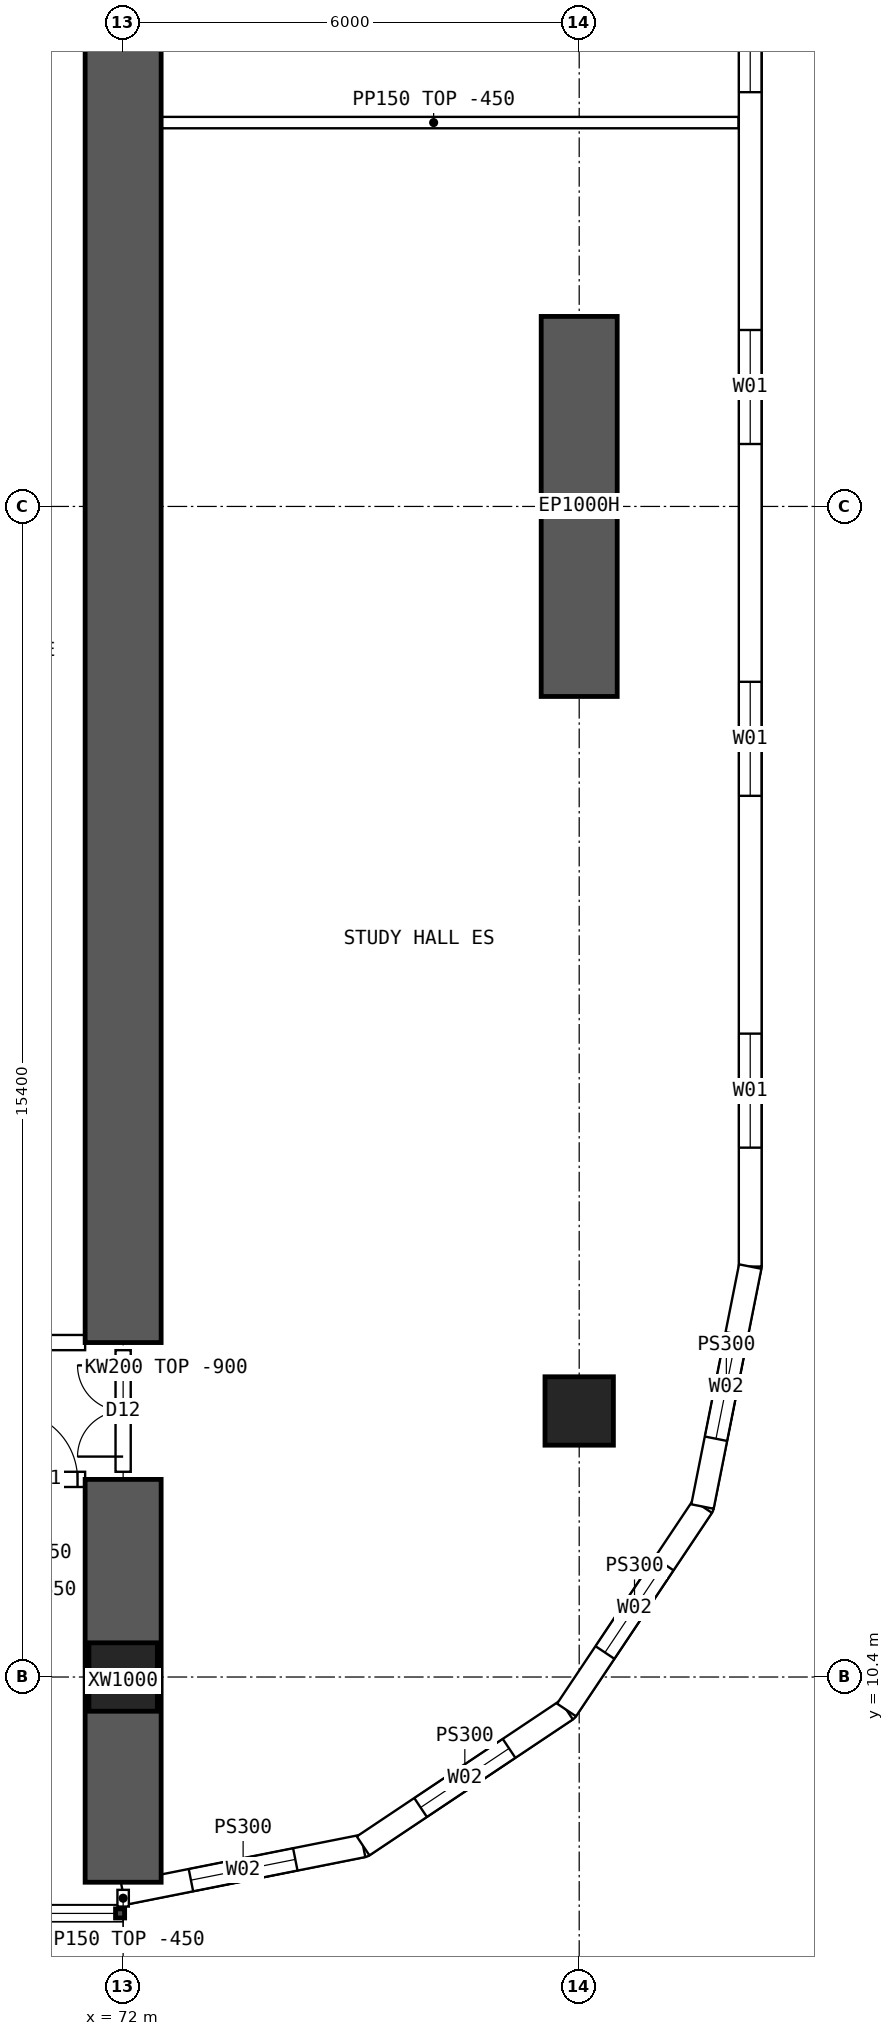
"""IFC4 building model, lengths in metres.
Left out: names, types, materials, properties, quantities, classifications, styles, units other than length and angle.
Written with IfcOpenShell. Run it as: python <this file> out.ifc"""

import sys

from ifc_helpers import new_model, si_unit, direction, frame, frame_2d, origin, origin_2d, place, context, subcontext, project, spatial, polyline, rectangle, hollow_rectangle, outline, extrude, element, fill, save


model = new_model("IFC4")
c1 = context("Model", 3, precision=1e-05, world=origin(), true_north=direction((0.0, 1.0)))
c2 = subcontext(c1, "Body", "Model", "MODEL_VIEW")
j1 = project(units=[si_unit("LENGTHUNIT", "METRE"), si_unit("PLANEANGLEUNIT", "RADIAN")], contexts=[c1])
p1 = place(None, origin())
s1 = spatial("IfcSite", under=j1, at=p1, CompositionType="ELEMENT")
p2 = place(p1, origin())
s2 = spatial("IfcBuilding", under=s1, at=p2, CompositionType="ELEMENT")
p3 = place(p2, frame((0.0, 0.0, 35.2)))
s3 = spatial("IfcBuildingStorey", under=s2, at=p3, CompositionType="ELEMENT", Elevation=35.2)
for number, where, z_axis, x_axis in (
    (1, (72.0, 10.4, 0.0), (0.0, 0.0, 1.0), (1.0, 0.0, 0.0)),
    (2, (78.0, 13.9, 0.0), (0.0, 0.0, 1.0), (1.0, 0.0, 0.0)),
):
    element("IfcColumn", number, at=place(p3, frame(where, z_axis=z_axis, x_axis=x_axis)), inside=s3, PredefinedType="COLUMN", context=c2, shape_type="SweptSolid", body=[
        extrude(hollow_rectangle(XDim=0.9, YDim=0.9, WallThickness=0.09, at=origin_2d()), origin(), (0.0, 0.0, 1.0), 3.75),
    ])
p4 = place(p3, frame((78.0, 23.3, 0.0), z_axis=(0.0, 0.0, 1.0), x_axis=(0.0, 1.0, 0.0)))
e3 = element("IfcWall", 3, at=p4, inside=s3, PredefinedType="SHEAR", context=c2, shape_type="SweptSolid", body=[
    extrude(rectangle(XDim=5.0, YDim=1.0, at=frame_2d((2.5, 0.0))), origin(), (0.0, 0.0, 1.0), 3.75),
])
p5 = place(p3, frame((72.0, 7.7, 0.0), z_axis=(0.0, 0.0, 1.0), x_axis=(0.0, 1.0, 0.0)))
e4 = element("IfcWall", 4, at=p5, inside=s3, PredefinedType="SHEAR", context=c2, shape_type="SweptSolid", body=[
    extrude(rectangle(XDim=5.3, YDim=1.0, at=frame_2d((2.65, 0.0))), origin(), (0.0, 0.0, 1.0), 3.75),
])
p6 = place(p3, frame((72.0, 14.8, 0.0), z_axis=(0.0, 0.0, 1.0), x_axis=(0.0, 1.0, 0.0)))
e5 = element("IfcWall", 5, at=p6, inside=s3, PredefinedType="SHEAR", context=c2, shape_type="SweptSolid", body=[
    extrude(rectangle(XDim=34.4, YDim=1.0, at=frame_2d((17.2, 0.0))), origin(), (0.0, 0.0, 1.0), 3.75),
])
p7 = place(p3, frame((80.25, 15.8, 0.0), z_axis=(0.0, 0.0, 1.0), x_axis=(0.0, 1.0, 0.0)))
e6 = element("IfcWall", 6, at=p7, inside=s3, PredefinedType="SOLIDWALL", context=c2, shape_type="SweptSolid", body=[
    extrude(outline(polyline([(-0.015, -0.15), (32.415, -0.15), (32.385, 0.15), (0.015, 0.15), (-0.015, -0.15)])), origin(), (0.0, 0.0, 1.0), 3.3),
])
p8 = place(p7, frame((1.564, 0.0, 0.9)))
e7 = element("IfcOpeningElement", 7, at=p8, cuts=e6, PredefinedType="OPENING", context=c2, shape_type="SweptSolid", body=[
    extrude(rectangle(XDim=1.5, YDim=2.0, at=frame_2d((0.75, 1.0))), frame((0.0, 0.16, 0.0), z_axis=(0.0, -1.0, 0.0), x_axis=(1.0, 0.0, 0.0)), (0.0, 0.0, 1.0), 0.32),
])
p9 = place(p7, frame((6.193, 0.0, 0.9)))
e8 = element("IfcOpeningElement", 8, at=p9, cuts=e6, PredefinedType="OPENING", context=c2, shape_type="SweptSolid", body=[
    extrude(rectangle(XDim=1.5, YDim=2.0, at=frame_2d((0.75, 1.0))), frame((0.0, 0.16, 0.0), z_axis=(0.0, -1.0, 0.0), x_axis=(1.0, 0.0, 0.0)), (0.0, 0.0, 1.0), 0.32),
])
p10 = place(p7, frame((10.822, 0.0, 0.9)))
e9 = element("IfcOpeningElement", 9, at=p10, cuts=e6, PredefinedType="OPENING", context=c2, shape_type="SweptSolid", body=[
    extrude(rectangle(XDim=1.5, YDim=2.0, at=frame_2d((0.75, 1.0))), frame((0.0, 0.16, 0.0), z_axis=(0.0, -1.0, 0.0), x_axis=(1.0, 0.0, 0.0)), (0.0, 0.0, 1.0), 0.32),
])
p11 = place(p7, frame((15.45, 0.0, 0.9)))
e10 = element("IfcOpeningElement", 10, at=p11, cuts=e6, PredefinedType="OPENING", context=c2, shape_type="SweptSolid", body=[
    extrude(rectangle(XDim=1.5, YDim=2.0, at=frame_2d((0.75, 1.0))), frame((0.0, 0.16, 0.0), z_axis=(0.0, -1.0, 0.0), x_axis=(1.0, 0.0, 0.0)), (0.0, 0.0, 1.0), 0.32),
])
p12 = place(p7, frame((20.079, 0.0, 0.9)))
e11 = element("IfcOpeningElement", 11, at=p12, cuts=e6, PredefinedType="OPENING", context=c2, shape_type="SweptSolid", body=[
    extrude(rectangle(XDim=1.5, YDim=2.0, at=frame_2d((0.75, 1.0))), frame((0.0, 0.16, 0.0), z_axis=(0.0, -1.0, 0.0), x_axis=(1.0, 0.0, 0.0)), (0.0, 0.0, 1.0), 0.32),
])
p13 = place(p7, frame((24.707, 0.0, 0.9)))
e12 = element("IfcOpeningElement", 12, at=p13, cuts=e6, PredefinedType="OPENING", context=c2, shape_type="SweptSolid", body=[
    extrude(rectangle(XDim=1.5, YDim=2.0, at=frame_2d((0.75, 1.0))), frame((0.0, 0.16, 0.0), z_axis=(0.0, -1.0, 0.0), x_axis=(1.0, 0.0, 0.0)), (0.0, 0.0, 1.0), 0.32),
])
p14 = place(p7, frame((29.336, 0.0, 0.9)))
e13 = element("IfcOpeningElement", 13, at=p14, cuts=e6, PredefinedType="OPENING", context=c2, shape_type="SweptSolid", body=[
    extrude(rectangle(XDim=1.5, YDim=2.0, at=frame_2d((0.75, 1.0))), frame((0.0, 0.16, 0.0), z_axis=(0.0, -1.0, 0.0), x_axis=(1.0, 0.0, 0.0)), (0.0, 0.0, 1.0), 0.32),
])
p15 = place(p3, frame((72.0, 7.55, 0.0), z_axis=(0.0, 0.0, 1.0), x_axis=(0.980787251524, 0.195080412259, 0.0)))
e14 = element("IfcWall", 14, at=p15, inside=s3, PredefinedType="SOLIDWALL", context=c2, shape_type="SweptSolid", body=[
    extrude(outline(polyline([(-0.03, -0.15), (3.249, -0.15), (3.189, 0.15), (0.03, 0.15), (-0.03, -0.15)])), origin(), (0.0, 0.0, 1.0), 3.3),
])
p16 = place(p15, frame((0.909, 0.0, 0.9)))
e15 = element("IfcOpeningElement", 15, at=p16, cuts=e14, PredefinedType="OPENING", context=c2, shape_type="SweptSolid", body=[
    extrude(rectangle(XDim=1.4, YDim=1.8, at=frame_2d((0.7, 0.9))), frame((0.0, 0.16, 0.0), z_axis=(0.0, -1.0, 0.0), x_axis=(1.0, 0.0, 0.0)), (0.0, 0.0, 1.0), 0.32),
])
p17 = place(p3, frame((75.157, 8.178, 0.0), z_axis=(0.0, 0.0, 1.0), x_axis=(0.831478105043, 0.555557522525, 0.0)))
e16 = element("IfcWall", 16, at=p17, inside=s3, PredefinedType="SOLIDWALL", context=c2, shape_type="SweptSolid", body=[
    extrude(outline(polyline([(-0.03, -0.15), (3.249, -0.15), (3.189, 0.15), (0.03, 0.15), (-0.03, -0.15)])), origin(), (0.0, 0.0, 1.0), 3.3),
])
p18 = place(p17, frame((0.909, 0.0, 0.9)))
e17 = element("IfcOpeningElement", 17, at=p18, cuts=e16, PredefinedType="OPENING", context=c2, shape_type="SweptSolid", body=[
    extrude(rectangle(XDim=1.4, YDim=1.8, at=frame_2d((0.7, 0.9))), frame((0.0, 0.16, 0.0), z_axis=(0.0, -1.0, 0.0), x_axis=(1.0, 0.0, 0.0)), (0.0, 0.0, 1.0), 0.32),
])
p19 = place(p3, frame((77.833, 9.966, 0.0), z_axis=(0.0, 0.0, 1.0), x_axis=(0.555609954424, 0.831443069936, 0.0)))
e18 = element("IfcWall", 18, at=p19, inside=s3, PredefinedType="SOLIDWALL", context=c2, shape_type="SweptSolid", body=[
    extrude(outline(polyline([(-0.03, -0.15), (3.249, -0.15), (3.189, 0.15), (0.03, 0.15), (-0.03, -0.15)])), origin(), (0.0, 0.0, 1.0), 3.3),
])
p20 = place(p19, frame((0.909, 0.0, 0.9)))
e19 = element("IfcOpeningElement", 19, at=p20, cuts=e18, PredefinedType="OPENING", context=c2, shape_type="SweptSolid", body=[
    extrude(rectangle(XDim=1.4, YDim=1.8, at=frame_2d((0.7, 0.9))), frame((0.0, 0.16, 0.0), z_axis=(0.0, -1.0, 0.0), x_axis=(1.0, 0.0, 0.0)), (0.0, 0.0, 1.0), 0.32),
])
p21 = place(p3, frame((79.622, 12.643, 0.0), z_axis=(0.0, 0.0, 1.0), x_axis=(0.195065901187, 0.980790137692, 0.0)))
e20 = element("IfcWall", 20, at=p21, inside=s3, PredefinedType="SOLIDWALL", context=c2, shape_type="SweptSolid", body=[
    extrude(outline(polyline([(-0.03, -0.15), (3.234, -0.15), (3.204, 0.15), (0.03, 0.15), (-0.03, -0.15)])), origin(), (0.0, 0.0, 1.0), 3.3),
])
p22 = place(p21, frame((0.909, 0.0, 0.9)))
e21 = element("IfcOpeningElement", 21, at=p22, cuts=e20, PredefinedType="OPENING", context=c2, shape_type="SweptSolid", body=[
    extrude(rectangle(XDim=1.4, YDim=1.8, at=frame_2d((0.7, 0.9))), frame((0.0, 0.16, 0.0), z_axis=(0.0, -1.0, 0.0), x_axis=(1.0, 0.0, 0.0)), (0.0, 0.0, 1.0), 0.32),
])
p23 = place(p3, frame((66.5, 13.0, 0.0), z_axis=(0.0, 0.0, 1.0), x_axis=(1.0, 0.0, 0.0)))
e22 = element("IfcWall", 22, at=p23, inside=s3, PredefinedType="SOLIDWALL", context=c2, shape_type="SweptSolid", body=[
    extrude(outline(polyline([(0.0, 0.0), (5.0, 0.0), (5.0, 2.9), (0.0, 2.9), (0.0, 0.0)])), frame((0.0, 0.1, 0.0), z_axis=(0.0, -1.0, 0.0), x_axis=(1.0, 0.0, 0.0)), (0.0, 0.0, 1.0), 0.2),
])
p24 = place(p23, frame((0.1, 0.0, 0.0)))
e23 = element("IfcOpeningElement", 23, at=p24, cuts=e22, PredefinedType="OPENING", context=c2, shape_type="SweptSolid", body=[
    extrude(rectangle(XDim=0.9, YDim=2.1, at=frame_2d((0.45, 1.05))), frame((0.0, 0.11, 0.0), z_axis=(0.0, -1.0, 0.0), x_axis=(1.0, 0.0, 0.0)), (0.0, 0.0, 1.0), 0.22),
])
p25 = place(p23, frame((4.0, 0.0, 0.0)))
e24 = element("IfcOpeningElement", 24, at=p25, cuts=e22, PredefinedType="OPENING", context=c2, shape_type="SweptSolid", body=[
    extrude(rectangle(XDim=0.9, YDim=2.1, at=frame_2d((0.45, 1.05))), frame((0.0, 0.11, 0.0), z_axis=(0.0, -1.0, 0.0), x_axis=(1.0, 0.0, 0.0)), (0.0, 0.0, 1.0), 0.22),
])
p26 = place(p3, frame((66.5, 14.8, 0.0), z_axis=(0.0, 0.0, 1.0), x_axis=(1.0, 0.0, 0.0)))
e25 = element("IfcWall", 25, at=p26, inside=s3, PredefinedType="SOLIDWALL", context=c2, shape_type="SweptSolid", body=[
    extrude(rectangle(XDim=5.0, YDim=0.2, at=frame_2d((2.5, 0.0))), origin(), (0.0, 0.0, 1.0), 3.3),
])
p27 = place(p26, frame((0.2, 0.0, 0.0)))
e26 = element("IfcOpeningElement", 26, at=p27, cuts=e25, PredefinedType="OPENING", context=c2, shape_type="SweptSolid", body=[
    extrude(rectangle(XDim=1.6, YDim=2.1, at=frame_2d((0.8, 1.05))), frame((0.0, 0.11, 0.0), z_axis=(0.0, -1.0, 0.0), x_axis=(1.0, 0.0, 0.0)), (0.0, 0.0, 1.0), 0.22),
])
p28 = place(p3, frame((72.075, 30.85, 0.0), z_axis=(0.0, 0.0, 1.0), x_axis=(1.0, 0.0, 0.0)))
e27 = element("IfcWall", 27, at=p28, inside=s3, PredefinedType="PARTITIONING", context=c2, shape_type="SweptSolid", body=[
    extrude(outline(polyline([(0.0, 0.0), (8.02, 0.0), (8.02, 3.3), (6.227, 3.3), (6.225, 2.85), (5.627, 2.85), (5.625, 3.3), (0.0, 3.3), (0.0, 0.0)])), frame((0.0, 0.075, 0.0), z_axis=(0.0, -1.0, 0.0), x_axis=(1.0, 0.0, 0.0)), (0.0, 0.0, 1.0), 0.15),
])
p29 = place(p3, frame((72.0, 13.1, 0.0), z_axis=(0.0, 0.0, 1.0), x_axis=(0.0, 1.0, 0.0)))
e28 = element("IfcWall", 28, at=p29, inside=s3, PredefinedType="SOLIDWALL", context=c2, shape_type="SweptSolid", body=[
    extrude(outline(polyline([(0.0, 0.0), (1.6, 0.0), (1.6, 2.85), (0.0, 2.85), (0.0, 0.0)])), frame((0.0, 0.1, 0.0), z_axis=(0.0, -1.0, 0.0), x_axis=(1.0, 0.0, 0.0)), (0.0, 0.0, 1.0), 0.2),
])
p30 = place(p29, frame((0.2, 0.0, 0.0)))
e29 = element("IfcOpeningElement", 29, at=p30, cuts=e28, PredefinedType="OPENING", context=c2, shape_type="SweptSolid", body=[
    extrude(rectangle(XDim=1.2, YDim=2.1, at=frame_2d((0.6, 1.05))), frame((0.0, 0.11, 0.0), z_axis=(0.0, -1.0, 0.0), x_axis=(1.0, 0.0, 0.0)), (0.0, 0.0, 1.0), 0.22),
])
p31 = place(p3, frame((72.0, 7.6, 0.0), z_axis=(0.0, 0.0, 1.0), x_axis=(0.0, -1.0, 0.0)))
e30 = element("IfcWall", 30, at=p31, inside=s3, PredefinedType="PARTITIONING", context=c2, shape_type="SweptSolid", body=[
    extrude(rectangle(XDim=0.22, YDim=0.15, at=frame_2d((0.11, 0.0))), origin(), (0.0, 0.0, 1.0), 3.3),
])
p32 = place(p8, origin())
e31 = element("IfcWindow", 31, at=p32, inside=s3, PartitioningType="SINGLE_PANEL", PredefinedType="WINDOW", context=c2, shape_type="SweptSolid", body=[
    extrude(rectangle(XDim=1.5, YDim=2.0, at=frame_2d((0.75, 1.0))), frame((0.0, 0.03, 0.0), z_axis=(0.0, -1.0, 0.0), x_axis=(1.0, 0.0, 0.0)), (0.0, 0.0, 1.0), 0.06),
])
fill(e7, e31)
p33 = place(p9, origin())
e32 = element("IfcWindow", 32, at=p33, inside=s3, PartitioningType="SINGLE_PANEL", PredefinedType="WINDOW", context=c2, shape_type="SweptSolid", body=[
    extrude(rectangle(XDim=1.5, YDim=2.0, at=frame_2d((0.75, 1.0))), frame((0.0, 0.03, 0.0), z_axis=(0.0, -1.0, 0.0), x_axis=(1.0, 0.0, 0.0)), (0.0, 0.0, 1.0), 0.06),
])
fill(e8, e32)
p34 = place(p10, origin())
e33 = element("IfcWindow", 33, at=p34, inside=s3, PartitioningType="SINGLE_PANEL", PredefinedType="WINDOW", context=c2, shape_type="SweptSolid", body=[
    extrude(rectangle(XDim=1.5, YDim=2.0, at=frame_2d((0.75, 1.0))), frame((0.0, 0.03, 0.0), z_axis=(0.0, -1.0, 0.0), x_axis=(1.0, 0.0, 0.0)), (0.0, 0.0, 1.0), 0.06),
])
fill(e9, e33)
p35 = place(p11, origin())
e34 = element("IfcWindow", 34, at=p35, inside=s3, PartitioningType="SINGLE_PANEL", PredefinedType="WINDOW", context=c2, shape_type="SweptSolid", body=[
    extrude(rectangle(XDim=1.5, YDim=2.0, at=frame_2d((0.75, 1.0))), frame((0.0, 0.03, 0.0), z_axis=(0.0, -1.0, 0.0), x_axis=(1.0, 0.0, 0.0)), (0.0, 0.0, 1.0), 0.06),
])
fill(e10, e34)
p36 = place(p16, origin())
e35 = element("IfcWindow", 35, at=p36, inside=s3, PartitioningType="SINGLE_PANEL", PredefinedType="WINDOW", context=c2, shape_type="SweptSolid", body=[
    extrude(rectangle(XDim=1.4, YDim=1.8, at=frame_2d((0.7, 0.9))), frame((0.0, 0.03, 0.0), z_axis=(0.0, -1.0, 0.0), x_axis=(1.0, 0.0, 0.0)), (0.0, 0.0, 1.0), 0.06),
])
fill(e15, e35)
p37 = place(p18, origin())
e36 = element("IfcWindow", 36, at=p37, inside=s3, PartitioningType="SINGLE_PANEL", PredefinedType="WINDOW", context=c2, shape_type="SweptSolid", body=[
    extrude(rectangle(XDim=1.4, YDim=1.8, at=frame_2d((0.7, 0.9))), frame((0.0, 0.03, 0.0), z_axis=(0.0, -1.0, 0.0), x_axis=(1.0, 0.0, 0.0)), (0.0, 0.0, 1.0), 0.06),
])
fill(e17, e36)
p38 = place(p20, origin())
e37 = element("IfcWindow", 37, at=p38, inside=s3, PartitioningType="SINGLE_PANEL", PredefinedType="WINDOW", context=c2, shape_type="SweptSolid", body=[
    extrude(rectangle(XDim=1.4, YDim=1.8, at=frame_2d((0.7, 0.9))), frame((0.0, 0.03, 0.0), z_axis=(0.0, -1.0, 0.0), x_axis=(1.0, 0.0, 0.0)), (0.0, 0.0, 1.0), 0.06),
])
fill(e19, e37)
p39 = place(p22, origin())
e38 = element("IfcWindow", 38, at=p39, inside=s3, PartitioningType="SINGLE_PANEL", PredefinedType="WINDOW", context=c2, shape_type="SweptSolid", body=[
    extrude(rectangle(XDim=1.4, YDim=1.8, at=frame_2d((0.7, 0.9))), frame((0.0, 0.03, 0.0), z_axis=(0.0, -1.0, 0.0), x_axis=(1.0, 0.0, 0.0)), (0.0, 0.0, 1.0), 0.06),
])
fill(e21, e38)
p40 = place(p25, origin())
e39 = element("IfcDoor", 39, at=p40, inside=s3, OperationType="SINGLE_SWING_LEFT", PredefinedType="DOOR", context=c2, shape_type="SweptSolid", body=[
    extrude(rectangle(XDim=0.9, YDim=2.1, at=frame_2d((0.45, 1.05))), frame((0.0, 0.025, 0.0), z_axis=(0.0, -1.0, 0.0), x_axis=(1.0, 0.0, 0.0)), (0.0, 0.0, 1.0), 0.05),
])
fill(e24, e39)
p41 = place(p30, origin())
e40 = element("IfcDoor", 40, at=p41, inside=s3, OperationType="DOUBLE_DOOR_SINGLE_SWING", PredefinedType="DOOR", context=c2, shape_type="SweptSolid", body=[
    extrude(rectangle(XDim=1.2, YDim=2.1, at=frame_2d((0.6, 1.05))), frame((0.0, 0.025, 0.0), z_axis=(0.0, -1.0, 0.0), x_axis=(1.0, 0.0, 0.0)), (0.0, 0.0, 1.0), 0.05),
])
fill(e29, e40)
save(model, sys.argv[1])
